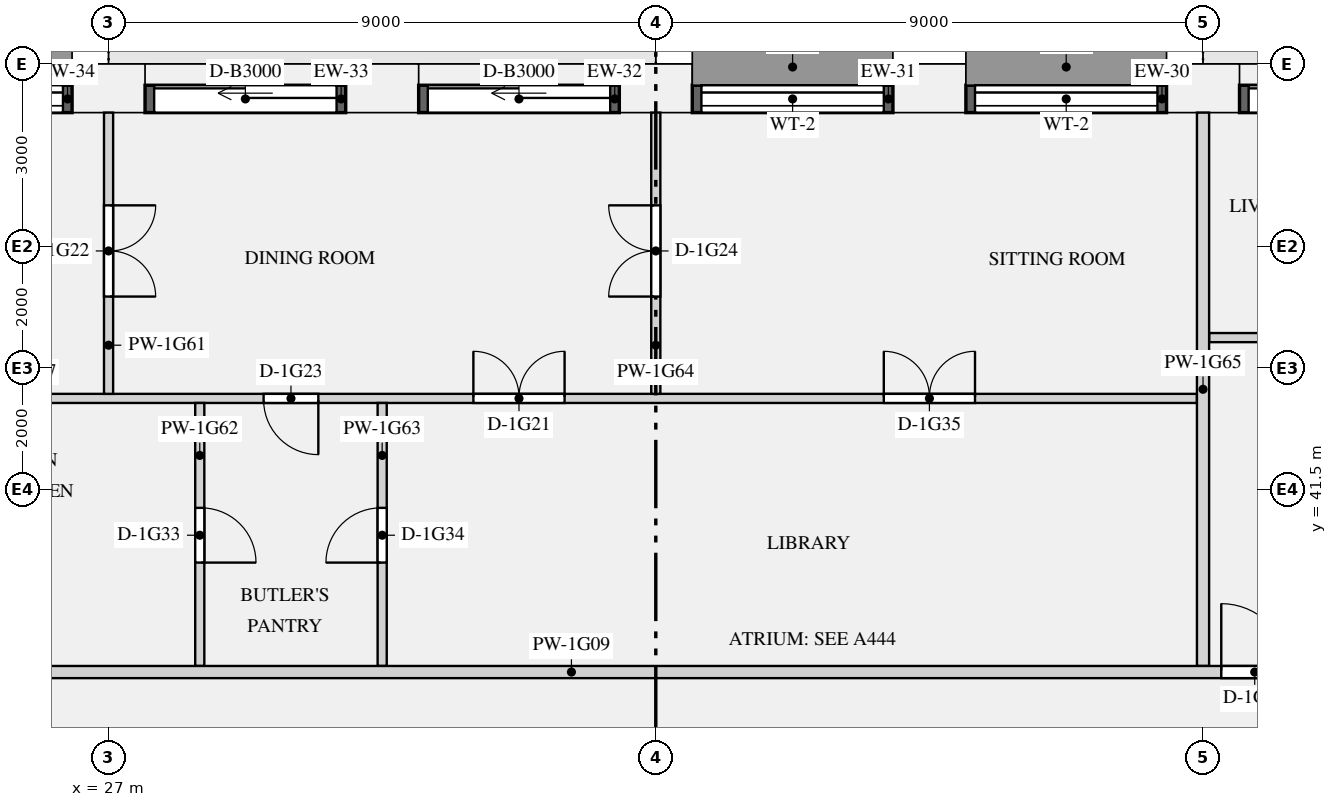
"""IFC4 building model, lengths in metres.
Left out: names, types, materials, properties, quantities, classifications, styles, units other than length and angle.
Written with IfcOpenShell. Run it as: python <this file> out.ifc"""

import sys

from ifc_helpers import new_model, si_unit, direction, frame, frame_2d, origin, origin_2d, place, context, subcontext, project, spatial, rectangle, extrude, element, fill, save


model = new_model("IFC4")
c1 = context("Model", 3, precision=1e-05, world=origin(), true_north=direction((0.0, 1.0)))
c2 = subcontext(c1, "Body", "Model", "MODEL_VIEW")
j1 = project(units=[si_unit("LENGTHUNIT", "METRE"), si_unit("PLANEANGLEUNIT", "RADIAN")], contexts=[c1])
p1 = place(None, origin())
s1 = spatial("IfcSite", under=j1, at=p1, CompositionType="ELEMENT")
p2 = place(p1, origin())
s2 = spatial("IfcBuilding", under=s1, at=p2, CompositionType="ELEMENT")
p3 = place(p2, frame((0.0, 0.0, 66.75)))
s3 = spatial("IfcBuildingStorey", under=s2, at=p3, CompositionType="ELEMENT", Elevation=66.75)
for number, where, z_axis, x_axis in (
    (1, (45.0, 48.1, 0.0), (0.0, 0.0, 1.0), (-1.0, 0.0, 0.0)),
    (2, (40.5, 48.1, 0.0), (0.0, 0.0, 1.0), (-1.0, 0.0, 0.0)),
    (3, (36.0, 48.1, 0.0), (0.0, 0.0, 1.0), (-1.0, 0.0, 0.0)),
    (4, (31.5, 48.1, 0.0), (0.0, 0.0, 1.0), (-1.0, 0.0, 0.0)),
    (5, (27.0, 48.1, 0.0), (0.0, 0.0, 1.0), (-1.0, 0.0, 0.0)),
):
    element("IfcColumn", number, at=place(p3, frame(where, z_axis=z_axis, x_axis=x_axis)), inside=s3, PredefinedType="USERDEFINED", context=c2, shape_type="SweptSolid", body=[
        extrude(rectangle(XDim=1.2, YDim=0.8, at=origin_2d()), origin(), (0.0, 0.0, 1.0), 3.15),
    ])
p4 = place(p3, frame((48.9, 47.925, 0.0), z_axis=(0.0, 0.0, 1.0), x_axis=(-1.0, 0.0, 0.0)))
e6 = element("IfcWall", 6, at=p4, inside=s3, PredefinedType="SOLIDWALL", context=c2, shape_type="SweptSolid", body=[
    extrude(rectangle(XDim=3.3, YDim=0.45, at=frame_2d((1.65, 0.0))), origin(), (0.0, 0.0, 1.0), 2.83),
])
p5 = place(p4, frame((0.15, 0.0, 0.0)))
e7 = element("IfcOpeningElement", 7, at=p5, cuts=e6, PredefinedType="OPENING", context=c2, shape_type="SweptSolid", body=[
    extrude(rectangle(XDim=3.0, YDim=2.3, at=frame_2d((1.5, 1.15))), frame((0.0, 0.235, 0.0), z_axis=(0.0, -1.0, 0.0), x_axis=(1.0, 0.0, 0.0)), (0.0, 0.0, 1.0), 0.47),
])
p6 = place(p3, frame((44.4, 47.925, 0.9), z_axis=(0.0, 0.0, 1.0), x_axis=(-1.0, 0.0, 0.0)))
e8 = element("IfcWall", 8, at=p6, inside=s3, PredefinedType="SOLIDWALL", context=c2, shape_type="SweptSolid", body=[
    extrude(rectangle(XDim=3.3, YDim=0.45, at=frame_2d((1.65, 0.0))), origin(), (0.0, 0.0, 1.0), 1.93),
])
p7 = place(p6, frame((0.15, 0.0, 0.15)))
e9 = element("IfcOpeningElement", 9, at=p7, cuts=e8, PredefinedType="OPENING", context=c2, shape_type="SweptSolid", body=[
    extrude(rectangle(XDim=3.0, YDim=1.5, at=frame_2d((1.5, 0.75))), frame((0.0, 0.235, 0.0), z_axis=(0.0, -1.0, 0.0), x_axis=(1.0, 0.0, 0.0)), (0.0, 0.0, 1.0), 0.47),
])
p8 = place(p3, frame((39.9, 47.925, 0.9), z_axis=(0.0, 0.0, 1.0), x_axis=(-1.0, 0.0, 0.0)))
e10 = element("IfcWall", 10, at=p8, inside=s3, PredefinedType="SOLIDWALL", context=c2, shape_type="SweptSolid", body=[
    extrude(rectangle(XDim=3.3, YDim=0.45, at=frame_2d((1.65, 0.0))), origin(), (0.0, 0.0, 1.0), 1.93),
])
p9 = place(p8, frame((0.15, 0.0, 0.15)))
e11 = element("IfcOpeningElement", 11, at=p9, cuts=e10, PredefinedType="OPENING", context=c2, shape_type="SweptSolid", body=[
    extrude(rectangle(XDim=3.0, YDim=1.5, at=frame_2d((1.5, 0.75))), frame((0.0, 0.235, 0.0), z_axis=(0.0, -1.0, 0.0), x_axis=(1.0, 0.0, 0.0)), (0.0, 0.0, 1.0), 0.47),
])
p10 = place(p3, frame((35.4, 47.925, 0.0), z_axis=(0.0, 0.0, 1.0), x_axis=(-1.0, 0.0, 0.0)))
e12 = element("IfcWall", 12, at=p10, inside=s3, PredefinedType="SOLIDWALL", context=c2, shape_type="SweptSolid", body=[
    extrude(rectangle(XDim=3.3, YDim=0.45, at=frame_2d((1.65, 0.0))), origin(), (0.0, 0.0, 1.0), 2.83),
])
p11 = place(p10, frame((0.15, 0.0, 0.0)))
e13 = element("IfcOpeningElement", 13, at=p11, cuts=e12, PredefinedType="OPENING", context=c2, shape_type="SweptSolid", body=[
    extrude(rectangle(XDim=3.0, YDim=2.3, at=frame_2d((1.5, 1.15))), frame((0.0, 0.235, 0.0), z_axis=(0.0, -1.0, 0.0), x_axis=(1.0, 0.0, 0.0)), (0.0, 0.0, 1.0), 0.47),
])
p12 = place(p3, frame((30.9, 47.925, 0.0), z_axis=(0.0, 0.0, 1.0), x_axis=(-1.0, 0.0, 0.0)))
e14 = element("IfcWall", 14, at=p12, inside=s3, PredefinedType="SOLIDWALL", context=c2, shape_type="SweptSolid", body=[
    extrude(rectangle(XDim=3.3, YDim=0.45, at=frame_2d((1.65, 0.0))), origin(), (0.0, 0.0, 1.0), 2.83),
])
p13 = place(p12, frame((0.15, 0.0, 0.0)))
e15 = element("IfcOpeningElement", 15, at=p13, cuts=e14, PredefinedType="OPENING", context=c2, shape_type="SweptSolid", body=[
    extrude(rectangle(XDim=3.0, YDim=2.3, at=frame_2d((1.5, 1.15))), frame((0.0, 0.235, 0.0), z_axis=(0.0, -1.0, 0.0), x_axis=(1.0, 0.0, 0.0)), (0.0, 0.0, 1.0), 0.47),
])
p14 = place(p3, frame((26.4, 47.925, 0.9), z_axis=(0.0, 0.0, 1.0), x_axis=(-1.0, 0.0, 0.0)))
e16 = element("IfcWall", 16, at=p14, inside=s3, PredefinedType="SOLIDWALL", context=c2, shape_type="SweptSolid", body=[
    extrude(rectangle(XDim=3.3, YDim=0.45, at=frame_2d((1.65, 0.0))), origin(), (0.0, 0.0, 1.0), 1.93),
])
p15 = place(p14, frame((0.15, 0.0, 0.15)))
e17 = element("IfcOpeningElement", 17, at=p15, cuts=e16, PredefinedType="OPENING", context=c2, shape_type="SweptSolid", body=[
    extrude(rectangle(XDim=3.0, YDim=1.5, at=frame_2d((1.5, 0.75))), frame((0.0, 0.235, 0.0), z_axis=(0.0, -1.0, 0.0), x_axis=(1.0, 0.0, 0.0)), (0.0, 0.0, 1.0), 0.47),
])
p16 = place(p3, frame((23.925, 38.5, 0.0), z_axis=(0.0, 0.0, 1.0), x_axis=(1.0, 0.0, 0.0)))
e18 = element("IfcWall", 18, at=p16, inside=s3, PredefinedType="PARTITIONING", context=c2, shape_type="SweptSolid", body=[
    extrude(rectangle(XDim=24.175, YDim=0.2, at=frame_2d((12.087, 0.0))), origin(), (0.0, 0.0, 1.0), 2.83),
])
p17 = place(p16, frame((21.375, 0.0, 0.0)))
e19 = element("IfcOpeningElement", 19, at=p17, cuts=e18, PredefinedType="OPENING", context=c2, shape_type="SweptSolid", body=[
    extrude(rectangle(XDim=1.1, YDim=2.1, at=frame_2d((0.55, 1.05))), frame((0.0, 0.11, 0.0), z_axis=(0.0, -1.0, 0.0), x_axis=(1.0, 0.0, 0.0)), (0.0, 0.0, 1.0), 0.22),
])
p18 = place(p3, frame((18.075, 43.0, 0.0), z_axis=(0.0, 0.0, 1.0), x_axis=(1.0, 0.0, 0.0)))
e20 = element("IfcWall", 20, at=p18, inside=s3, PredefinedType="PARTITIONING", context=c2, shape_type="SweptSolid", body=[
    extrude(rectangle(XDim=26.825, YDim=0.15, at=frame_2d((13.413, 0.0))), origin(), (0.0, 0.0, 1.0), 2.83),
])
p19 = place(p18, frame((14.925, 0.0, 0.0)))
e21 = element("IfcOpeningElement", 21, at=p19, cuts=e20, PredefinedType="OPENING", context=c2, shape_type="SweptSolid", body=[
    extrude(rectangle(XDim=1.5, YDim=2.1, at=frame_2d((0.75, 1.05))), frame((0.0, 0.085, 0.0), z_axis=(0.0, -1.0, 0.0), x_axis=(1.0, 0.0, 0.0)), (0.0, 0.0, 1.0), 0.17),
])
p20 = place(p18, frame((11.475, 0.0, 0.0)))
e22 = element("IfcOpeningElement", 22, at=p20, cuts=e20, PredefinedType="OPENING", context=c2, shape_type="SweptSolid", body=[
    extrude(rectangle(XDim=0.9, YDim=2.1, at=frame_2d((0.45, 1.05))), frame((0.0, 0.085, 0.0), z_axis=(0.0, -1.0, 0.0), x_axis=(1.0, 0.0, 0.0)), (0.0, 0.0, 1.0), 0.17),
])
p21 = place(p18, frame((2.475, 0.0, 0.0)))
e23 = element("IfcOpeningElement", 23, at=p21, cuts=e20, PredefinedType="OPENING", context=c2, shape_type="SweptSolid", body=[
    extrude(rectangle(XDim=0.9, YDim=2.1, at=frame_2d((0.45, 1.05))), frame((0.0, 0.085, 0.0), z_axis=(0.0, -1.0, 0.0), x_axis=(1.0, 0.0, 0.0)), (0.0, 0.0, 1.0), 0.17),
])
p22 = place(p18, frame((21.675, 0.0, 0.0)))
e24 = element("IfcOpeningElement", 24, at=p22, cuts=e20, PredefinedType="OPENING", context=c2, shape_type="SweptSolid", body=[
    extrude(rectangle(XDim=1.5, YDim=2.1, at=frame_2d((0.75, 1.05))), frame((0.0, 0.085, 0.0), z_axis=(0.0, -1.0, 0.0), x_axis=(1.0, 0.0, 0.0)), (0.0, 0.0, 1.0), 0.17),
])
p23 = place(p3, frame((45.1, 44.0, 0.0), z_axis=(0.0, 0.0, 1.0), x_axis=(1.0, 0.0, 0.0)))
e25 = element("IfcWall", 25, at=p23, inside=s3, PredefinedType="PARTITIONING", context=c2, shape_type="SweptSolid", body=[
    extrude(rectangle(XDim=8.825, YDim=0.15, at=frame_2d((4.413, 0.0))), origin(), (0.0, 0.0, 1.0), 2.83),
])
p24 = place(p23, frame((6.2, 0.0, 0.0)))
e26 = element("IfcOpeningElement", 26, at=p24, cuts=e25, PredefinedType="OPENING", context=c2, shape_type="SweptSolid", body=[
    extrude(rectangle(XDim=0.9, YDim=2.1, at=frame_2d((0.45, 1.05))), frame((0.0, 0.085, 0.0), z_axis=(0.0, -1.0, 0.0), x_axis=(1.0, 0.0, 0.0)), (0.0, 0.0, 1.0), 0.17),
])
p25 = place(p23, frame((1.7, 0.0, 0.0)))
e27 = element("IfcOpeningElement", 27, at=p25, cuts=e25, PredefinedType="OPENING", context=c2, shape_type="SweptSolid", body=[
    extrude(rectangle(XDim=0.9, YDim=2.1, at=frame_2d((0.45, 1.05))), frame((0.0, 0.085, 0.0), z_axis=(0.0, -1.0, 0.0), x_axis=(1.0, 0.0, 0.0)), (0.0, 0.0, 1.0), 0.17),
])
p26 = place(p3, frame((27.0, 43.075, 0.0), z_axis=(0.0, 0.0, 1.0), x_axis=(0.0, 1.0, 0.0)))
e28 = element("IfcWall", 28, at=p26, inside=s3, PredefinedType="PARTITIONING", context=c2, shape_type="SweptSolid", body=[
    extrude(rectangle(XDim=4.625, YDim=0.15, at=frame_2d((2.312, 0.0))), origin(), (0.0, 0.0, 1.0), 2.83),
])
p27 = place(p26, frame((1.6, 0.0, 0.0)))
e29 = element("IfcOpeningElement", 29, at=p27, cuts=e28, PredefinedType="OPENING", context=c2, shape_type="SweptSolid", body=[
    extrude(rectangle(XDim=1.5, YDim=2.1, at=frame_2d((0.75, 1.05))), frame((0.0, 0.085, 0.0), z_axis=(0.0, -1.0, 0.0), x_axis=(1.0, 0.0, 0.0)), (0.0, 0.0, 1.0), 0.17),
])
p28 = place(p3, frame((28.5, 38.6, 0.0), z_axis=(0.0, 0.0, 1.0), x_axis=(0.0, 1.0, 0.0)))
e30 = element("IfcWall", 30, at=p28, inside=s3, PredefinedType="PARTITIONING", context=c2, shape_type="SweptSolid", body=[
    extrude(rectangle(XDim=4.325, YDim=0.15, at=frame_2d((2.163, 0.0))), origin(), (0.0, 0.0, 1.0), 2.83),
])
p29 = place(p28, frame((1.7, 0.0, 0.0)))
e31 = element("IfcOpeningElement", 31, at=p29, cuts=e30, PredefinedType="OPENING", context=c2, shape_type="SweptSolid", body=[
    extrude(rectangle(XDim=0.9, YDim=2.1, at=frame_2d((0.45, 1.05))), frame((0.0, 0.085, 0.0), z_axis=(0.0, -1.0, 0.0), x_axis=(1.0, 0.0, 0.0)), (0.0, 0.0, 1.0), 0.17),
])
p30 = place(p3, frame((31.5, 38.6, 0.0), z_axis=(0.0, 0.0, 1.0), x_axis=(0.0, 1.0, 0.0)))
e32 = element("IfcWall", 32, at=p30, inside=s3, PredefinedType="PARTITIONING", context=c2, shape_type="SweptSolid", body=[
    extrude(rectangle(XDim=4.325, YDim=0.15, at=frame_2d((2.163, 0.0))), origin(), (0.0, 0.0, 1.0), 2.83),
])
p31 = place(p30, frame((1.7, 0.0, 0.0)))
e33 = element("IfcOpeningElement", 33, at=p31, cuts=e32, PredefinedType="OPENING", context=c2, shape_type="SweptSolid", body=[
    extrude(rectangle(XDim=0.9, YDim=2.1, at=frame_2d((0.45, 1.05))), frame((0.0, 0.085, 0.0), z_axis=(0.0, -1.0, 0.0), x_axis=(1.0, 0.0, 0.0)), (0.0, 0.0, 1.0), 0.17),
])
p32 = place(p3, frame((36.0, 43.075, 0.0), z_axis=(0.0, 0.0, 1.0), x_axis=(0.0, 1.0, 0.0)))
e34 = element("IfcWall", 34, at=p32, inside=s3, PredefinedType="PARTITIONING", context=c2, shape_type="SweptSolid", body=[
    extrude(rectangle(XDim=4.625, YDim=0.15, at=frame_2d((2.312, 0.0))), origin(), (0.0, 0.0, 1.0), 2.83),
])
p33 = place(p32, frame((1.6, 0.0, 0.0)))
e35 = element("IfcOpeningElement", 35, at=p33, cuts=e34, PredefinedType="OPENING", context=c2, shape_type="SweptSolid", body=[
    extrude(rectangle(XDim=1.5, YDim=2.1, at=frame_2d((0.75, 1.05))), frame((0.0, 0.085, 0.0), z_axis=(0.0, -1.0, 0.0), x_axis=(1.0, 0.0, 0.0)), (0.0, 0.0, 1.0), 0.17),
])
p34 = place(p3, frame((45.0, 38.6, 0.0), z_axis=(0.0, 0.0, 1.0), x_axis=(0.0, 1.0, 0.0)))
e36 = element("IfcWall", 36, at=p34, inside=s3, PredefinedType="PARTITIONING", context=c2, shape_type="SweptSolid", body=[
    extrude(rectangle(XDim=9.1, YDim=0.2, at=frame_2d((4.55, 0.0))), origin(), (0.0, 0.0, 1.0), 2.83),
])
p35 = place(p5, origin())
e37 = element("IfcDoor", 37, at=p35, inside=s3, OperationType="SLIDING_TO_LEFT", PredefinedType="DOOR", context=c2, shape_type="SweptSolid", body=[
    extrude(rectangle(XDim=3.0, YDim=2.3, at=frame_2d((1.5, 1.15))), frame((0.0, -0.07, 0.0), z_axis=(0.0, -1.0, 0.0), x_axis=(1.0, 0.0, 0.0)), (0.0, 0.0, 1.0), 0.05),
])
fill(e7, e37)
p36 = place(p7, origin())
e38 = element("IfcWindow", 38, at=p36, inside=s3, PartitioningType="SINGLE_PANEL", PredefinedType="WINDOW", context=c2, shape_type="SweptSolid", body=[
    extrude(rectangle(XDim=3.0, YDim=1.5, at=frame_2d((1.5, 0.75))), frame((0.0, -0.065, 0.0), z_axis=(0.0, -1.0, 0.0), x_axis=(1.0, 0.0, 0.0)), (0.0, 0.0, 1.0), 0.06),
])
fill(e9, e38)
p37 = place(p9, origin())
e39 = element("IfcWindow", 39, at=p37, inside=s3, PartitioningType="SINGLE_PANEL", PredefinedType="WINDOW", context=c2, shape_type="SweptSolid", body=[
    extrude(rectangle(XDim=3.0, YDim=1.5, at=frame_2d((1.5, 0.75))), frame((0.0, -0.065, 0.0), z_axis=(0.0, -1.0, 0.0), x_axis=(1.0, 0.0, 0.0)), (0.0, 0.0, 1.0), 0.06),
])
fill(e11, e39)
p38 = place(p11, origin())
e40 = element("IfcDoor", 40, at=p38, inside=s3, OperationType="SLIDING_TO_LEFT", PredefinedType="DOOR", context=c2, shape_type="SweptSolid", body=[
    extrude(rectangle(XDim=3.0, YDim=2.3, at=frame_2d((1.5, 1.15))), frame((0.0, -0.07, 0.0), z_axis=(0.0, -1.0, 0.0), x_axis=(1.0, 0.0, 0.0)), (0.0, 0.0, 1.0), 0.05),
])
fill(e13, e40)
p39 = place(p13, origin())
e41 = element("IfcDoor", 41, at=p39, inside=s3, OperationType="SLIDING_TO_LEFT", PredefinedType="DOOR", context=c2, shape_type="SweptSolid", body=[
    extrude(rectangle(XDim=3.0, YDim=2.3, at=frame_2d((1.5, 1.15))), frame((0.0, -0.07, 0.0), z_axis=(0.0, -1.0, 0.0), x_axis=(1.0, 0.0, 0.0)), (0.0, 0.0, 1.0), 0.05),
])
fill(e15, e41)
p40 = place(p15, origin())
e42 = element("IfcWindow", 42, at=p40, inside=s3, PartitioningType="SINGLE_PANEL", PredefinedType="WINDOW", context=c2, shape_type="SweptSolid", body=[
    extrude(rectangle(XDim=3.0, YDim=1.5, at=frame_2d((1.5, 0.75))), frame((0.0, -0.065, 0.0), z_axis=(0.0, -1.0, 0.0), x_axis=(1.0, 0.0, 0.0)), (0.0, 0.0, 1.0), 0.06),
])
fill(e17, e42)
p41 = place(p19, origin())
e43 = element("IfcDoor", 43, at=p41, inside=s3, OperationType="DOUBLE_DOOR_SINGLE_SWING", PredefinedType="DOOR", context=c2, shape_type="SweptSolid", body=[
    extrude(rectangle(XDim=1.5, YDim=2.1, at=frame_2d((0.75, 1.05))), frame((0.0, 0.025, 0.0), z_axis=(0.0, -1.0, 0.0), x_axis=(1.0, 0.0, 0.0)), (0.0, 0.0, 1.0), 0.05),
])
fill(e21, e43)
p42 = place(p27, frame((1.5, 0.0, 0.0), z_axis=(0.0, 0.0, 1.0), x_axis=(-1.0, 0.0, 0.0)))
e44 = element("IfcDoor", 44, at=p42, inside=s3, OperationType="DOUBLE_DOOR_SINGLE_SWING", PredefinedType="DOOR", context=c2, shape_type="SweptSolid", body=[
    extrude(rectangle(XDim=1.5, YDim=2.1, at=frame_2d((0.75, 1.05))), frame((0.0, 0.025, 0.0), z_axis=(0.0, -1.0, 0.0), x_axis=(1.0, 0.0, 0.0)), (0.0, 0.0, 1.0), 0.05),
])
fill(e29, e44)
p43 = place(p20, frame((0.9, 0.0, 0.0), z_axis=(0.0, 0.0, 1.0), x_axis=(-1.0, 0.0, 0.0)))
e45 = element("IfcDoor", 45, at=p43, inside=s3, OperationType="SINGLE_SWING_LEFT", PredefinedType="DOOR", context=c2, shape_type="SweptSolid", body=[
    extrude(rectangle(XDim=0.9, YDim=2.1, at=frame_2d((0.45, 1.05))), frame((0.0, 0.025, 0.0), z_axis=(0.0, -1.0, 0.0), x_axis=(1.0, 0.0, 0.0)), (0.0, 0.0, 1.0), 0.05),
])
fill(e22, e45)
p44 = place(p33, origin())
e46 = element("IfcDoor", 46, at=p44, inside=s3, OperationType="DOUBLE_DOOR_SINGLE_SWING", PredefinedType="DOOR", context=c2, shape_type="SweptSolid", body=[
    extrude(rectangle(XDim=1.5, YDim=2.1, at=frame_2d((0.75, 1.05))), frame((0.0, 0.025, 0.0), z_axis=(0.0, -1.0, 0.0), x_axis=(1.0, 0.0, 0.0)), (0.0, 0.0, 1.0), 0.05),
])
fill(e35, e46)
p45 = place(p29, frame((0.9, 0.0, 0.0), z_axis=(0.0, 0.0, 1.0), x_axis=(-1.0, 0.0, 0.0)))
e47 = element("IfcDoor", 47, at=p45, inside=s3, OperationType="SINGLE_SWING_RIGHT", PredefinedType="DOOR", context=c2, shape_type="SweptSolid", body=[
    extrude(rectangle(XDim=0.9, YDim=2.1, at=frame_2d((0.45, 1.05))), frame((0.0, 0.025, 0.0), z_axis=(0.0, -1.0, 0.0), x_axis=(1.0, 0.0, 0.0)), (0.0, 0.0, 1.0), 0.05),
])
fill(e31, e47)
p46 = place(p31, origin())
e48 = element("IfcDoor", 48, at=p46, inside=s3, OperationType="SINGLE_SWING_LEFT", PredefinedType="DOOR", context=c2, shape_type="SweptSolid", body=[
    extrude(rectangle(XDim=0.9, YDim=2.1, at=frame_2d((0.45, 1.05))), frame((0.0, 0.025, 0.0), z_axis=(0.0, -1.0, 0.0), x_axis=(1.0, 0.0, 0.0)), (0.0, 0.0, 1.0), 0.05),
])
fill(e33, e48)
p47 = place(p22, origin())
e49 = element("IfcDoor", 49, at=p47, inside=s3, OperationType="DOUBLE_DOOR_SINGLE_SWING", PredefinedType="DOOR", context=c2, shape_type="SweptSolid", body=[
    extrude(rectangle(XDim=1.5, YDim=2.1, at=frame_2d((0.75, 1.05))), frame((0.0, 0.025, 0.0), z_axis=(0.0, -1.0, 0.0), x_axis=(1.0, 0.0, 0.0)), (0.0, 0.0, 1.0), 0.05),
])
fill(e24, e49)
p48 = place(p17, origin())
e50 = element("IfcDoor", 50, at=p48, inside=s3, OperationType="SINGLE_SWING_LEFT", PredefinedType="DOOR", context=c2, shape_type="SweptSolid", body=[
    extrude(rectangle(XDim=1.1, YDim=2.1, at=frame_2d((0.55, 1.05))), frame((0.0, 0.025, 0.0), z_axis=(0.0, -1.0, 0.0), x_axis=(1.0, 0.0, 0.0)), (0.0, 0.0, 1.0), 0.05),
])
fill(e19, e50)
save(model, sys.argv[1])
